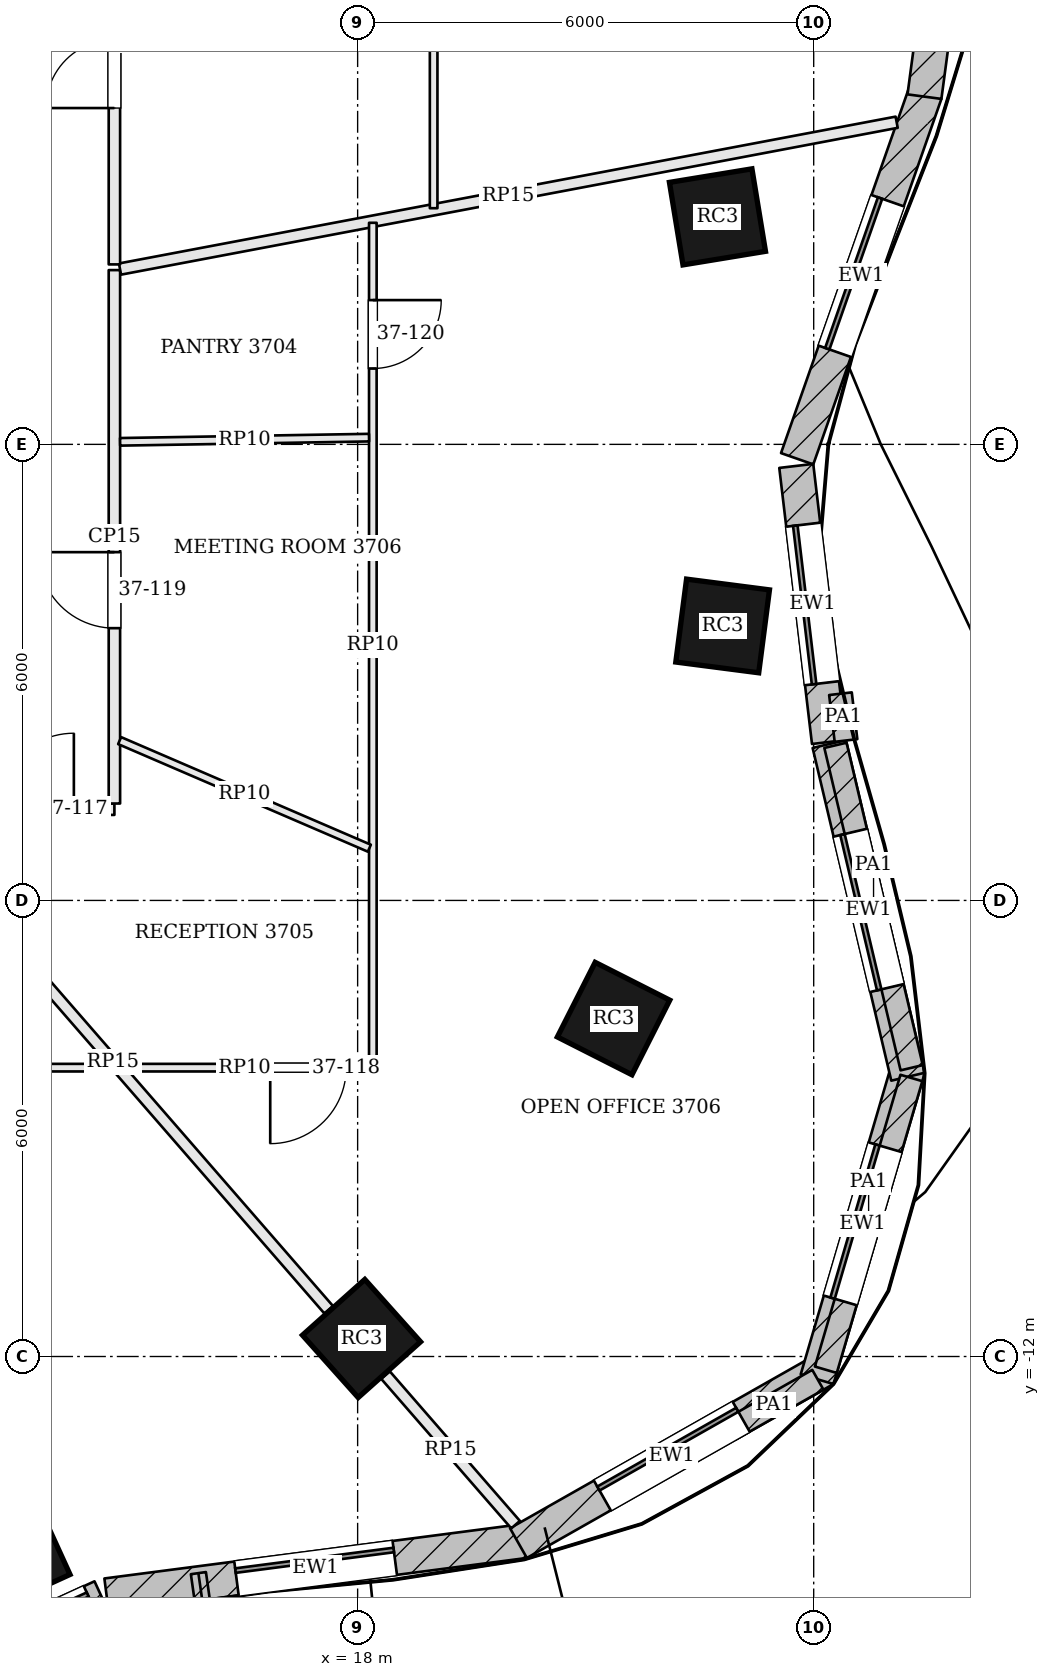
"""IFC4 building model, lengths in metres.
Left out: names, types, materials, properties, quantities, classifications, styles, units other than length and angle.
Written with IfcOpenShell. Run it as: python <this file> out.ifc"""

import sys

from ifc_helpers import new_model, si_unit, direction, frame, frame_2d, origin, origin_2d, place, context, subcontext, project, spatial, rectangle, extrude, element, fill, save


model = new_model("IFC4")
c1 = context("Model", 3, precision=1e-05, world=origin(), true_north=direction((0.0, 1.0)))
c2 = subcontext(c1, "Body", "Model", "MODEL_VIEW")
j1 = project(units=[si_unit("LENGTHUNIT", "METRE"), si_unit("PLANEANGLEUNIT", "RADIAN")], contexts=[c1])
p1 = place(None, origin())
s1 = spatial("IfcSite", under=j1, at=p1, CompositionType="ELEMENT")
p2 = place(p1, origin())
s2 = spatial("IfcBuilding", under=s1, at=p2, CompositionType="ELEMENT")
p3 = place(p2, frame((0.0, 0.0, 153.9)))
s3 = spatial("IfcBuildingStorey", under=s2, at=p3, CompositionType="ELEMENT", Elevation=153.9)
for number, where, z_axis, x_axis in (
    (1, (22.734, 2.993, 0.0), (0.0, 0.0, 1.0), (-0.162, 0.987, 0.0)),
    (2, (13.487, -14.596, 0.0), (0.0, 0.0, 1.0), (0.91, 0.415, 0.0)),
    (3, (18.051, -11.763, 0.0), (0.0, 0.0, 1.0), (0.746, 0.666, 0.0)),
    (4, (21.367, -7.554, 0.0), (0.0, 0.0, 1.0), (0.452, 0.892, 0.0)),
    (5, (22.802, -2.389, 0.0), (0.0, 0.0, 1.0), (0.129, 0.992, 0.0)),
):
    element("IfcColumn", number, at=place(p3, frame(where, z_axis=z_axis, x_axis=x_axis)), inside=s3, PredefinedType="COLUMN", context=c2, shape_type="SweptSolid", body=[
        extrude(rectangle(XDim=1.1, YDim=1.1, at=origin_2d()), origin(), (0.0, 0.0, 1.0), 3.9),
    ])
p4 = place(p3, frame((23.782, -0.189, 0.0), z_axis=(0.0, 0.0, 1.0), x_axis=(0.330794307703, 0.943702880144, 0.0)))
e6 = element("IfcWall", 6, at=p4, inside=s3, PredefinedType="SOLIDWALL", context=c2, shape_type="SweptSolid", body=[
    extrude(rectangle(XDim=5.095, YDim=0.45, at=frame_2d((2.548, 0.0))), origin(), (0.0, 0.0, 1.0), 3.7),
])
p5 = place(p4, frame((1.498, 0.0, 0.9)))
e7 = element("IfcOpeningElement", 7, at=p5, cuts=e6, PredefinedType="OPENING", context=c2, shape_type="SweptSolid", body=[
    extrude(rectangle(XDim=2.1, YDim=2.3, at=frame_2d((1.05, 1.15))), frame((0.0, 0.235, 0.0), z_axis=(0.0, -1.0, 0.0), x_axis=(1.0, 0.0, 0.0)), (0.0, 0.0, 1.0), 0.47),
])
p6 = place(p3, frame((25.457, 4.575, 0.0), z_axis=(0.0, 0.0, 1.0), x_axis=(0.132475046402, 0.991186340746, 0.0)))
e8 = element("IfcWall", 8, at=p6, inside=s3, PredefinedType="SOLIDWALL", context=c2, shape_type="SweptSolid", body=[
    extrude(rectangle(XDim=4.007, YDim=0.45, at=frame_2d((2.003, 0.0))), origin(), (0.0, 0.0, 1.0), 3.7),
])
p7 = place(p6, frame((0.953, 0.0, 0.9)))
e9 = element("IfcOpeningElement", 9, at=p7, cuts=e8, PredefinedType="OPENING", context=c2, shape_type="SweptSolid", body=[
    extrude(rectangle(XDim=2.1, YDim=2.3, at=frame_2d((1.05, 1.15))), frame((0.0, 0.235, 0.0), z_axis=(0.0, -1.0, 0.0), x_axis=(1.0, 0.0, 0.0)), (0.0, 0.0, 1.0), 0.47),
])
p8 = place(p3, frame((12.444, -16.169, 0.0), z_axis=(0.0, 0.0, 1.0), x_axis=(0.908468904074, 0.417952449844, 0.0)))
e10 = element("IfcWall", 10, at=p8, inside=s3, PredefinedType="SOLIDWALL", context=c2, shape_type="SweptSolid", body=[
    extrude(rectangle(XDim=2.409, YDim=0.45, at=frame_2d((1.205, 0.0))), origin(), (0.0, 0.0, 1.0), 3.7),
])
p9 = place(p8, frame((0.155, 0.0, 0.9)))
e11 = element("IfcOpeningElement", 11, at=p9, cuts=e10, PredefinedType="OPENING", context=c2, shape_type="SweptSolid", body=[
    extrude(rectangle(XDim=2.1, YDim=2.3, at=frame_2d((1.05, 1.15))), frame((0.0, 0.235, 0.0), z_axis=(0.0, -1.0, 0.0), x_axis=(1.0, 0.0, 0.0)), (0.0, 0.0, 1.0), 0.47),
])
p10 = place(p3, frame((14.697, -15.143, 0.0), z_axis=(0.0, 0.0, 1.0), x_axis=(0.991631798411, 0.129098320597, 0.0)))
e12 = element("IfcWall", 12, at=p10, inside=s3, PredefinedType="SOLIDWALL", context=c2, shape_type="SweptSolid", body=[
    extrude(rectangle(XDim=5.547, YDim=0.45, at=frame_2d((2.773, 0.0))), origin(), (0.0, 0.0, 1.0), 3.7),
])
p11 = place(p10, frame((1.723, 0.0, 0.9)))
e13 = element("IfcOpeningElement", 13, at=p11, cuts=e12, PredefinedType="OPENING", context=c2, shape_type="SweptSolid", body=[
    extrude(rectangle(XDim=2.1, YDim=2.3, at=frame_2d((1.05, 1.15))), frame((0.0, 0.235, 0.0), z_axis=(0.0, -1.0, 0.0), x_axis=(1.0, 0.0, 0.0)), (0.0, 0.0, 1.0), 0.47),
])
p12 = place(p3, frame((20.115, -14.455, 0.0), z_axis=(0.0, 0.0, 1.0), x_axis=(0.869822679286, 0.493364476427, 0.0)))
e14 = element("IfcWall", 14, at=p12, inside=s3, PredefinedType="SOLIDWALL", context=c2, shape_type="SweptSolid", body=[
    extrude(rectangle(XDim=4.638, YDim=0.45, at=frame_2d((2.319, 0.0))), origin(), (0.0, 0.0, 1.0), 3.7),
])
p13 = place(p12, frame((1.269, 0.0, 0.9)))
e15 = element("IfcOpeningElement", 15, at=p13, cuts=e14, PredefinedType="OPENING", context=c2, shape_type="SweptSolid", body=[
    extrude(rectangle(XDim=2.1, YDim=2.3, at=frame_2d((1.05, 1.15))), frame((0.0, 0.235, 0.0), z_axis=(0.0, -1.0, 0.0), x_axis=(1.0, 0.0, 0.0)), (0.0, 0.0, 1.0), 0.47),
])
p14 = place(p3, frame((24.045, -12.299, 0.0), z_axis=(0.0, 0.0, 1.0), x_axis=(0.281381418228, 0.95959600743, 0.0)))
e16 = element("IfcWall", 16, at=p14, inside=s3, PredefinedType="SOLIDWALL", context=c2, shape_type="SweptSolid", body=[
    extrude(rectangle(XDim=4.261, YDim=0.45, at=frame_2d((2.13, 0.0))), origin(), (0.0, 0.0, 1.0), 3.7),
])
p15 = place(p14, frame((1.081, 0.0, 0.9)))
e17 = element("IfcOpeningElement", 17, at=p15, cuts=e16, PredefinedType="OPENING", context=c2, shape_type="SweptSolid", body=[
    extrude(rectangle(XDim=2.1, YDim=2.3, at=frame_2d((1.05, 1.15))), frame((0.0, 0.235, 0.0), z_axis=(0.0, -1.0, 0.0), x_axis=(1.0, 0.0, 0.0)), (0.0, 0.0, 1.0), 0.47),
])
p16 = place(p3, frame((25.24, -8.319, 0.0), z_axis=(0.0, 0.0, 1.0), x_axis=(-0.230037604827, 0.973181740666, 0.0)))
e18 = element("IfcWall", 18, at=p16, inside=s3, PredefinedType="SOLIDWALL", context=c2, shape_type="SweptSolid", body=[
    extrude(rectangle(XDim=4.498, YDim=0.45, at=frame_2d((2.249, 0.0))), origin(), (0.0, 0.0, 1.0), 3.7),
])
p17 = place(p16, frame((1.199, 0.0, 0.9)))
e19 = element("IfcOpeningElement", 19, at=p17, cuts=e18, PredefinedType="OPENING", context=c2, shape_type="SweptSolid", body=[
    extrude(rectangle(XDim=2.1, YDim=2.3, at=frame_2d((1.05, 1.15))), frame((0.0, 0.235, 0.0), z_axis=(0.0, -1.0, 0.0), x_axis=(1.0, 0.0, 0.0)), (0.0, 0.0, 1.0), 0.47),
])
p18 = place(p3, frame((24.201, -3.915, 0.0), z_axis=(0.0, 0.0, 1.0), x_axis=(-0.117623597589, 0.993058250703, 0.0)))
e20 = element("IfcWall", 20, at=p18, inside=s3, PredefinedType="SOLIDWALL", context=c2, shape_type="SweptSolid", body=[
    extrude(rectangle(XDim=3.657, YDim=0.45, at=frame_2d((1.829, 0.0))), origin(), (0.0, 0.0, 1.0), 3.7),
])
p19 = place(p18, frame((0.779, 0.0, 0.9)))
e21 = element("IfcOpeningElement", 21, at=p19, cuts=e20, PredefinedType="OPENING", context=c2, shape_type="SweptSolid", body=[
    extrude(rectangle(XDim=2.1, YDim=2.3, at=frame_2d((1.05, 1.15))), frame((0.0, 0.235, 0.0), z_axis=(0.0, -1.0, 0.0), x_axis=(1.0, 0.0, 0.0)), (0.0, 0.0, 1.0), 0.47),
])
p20 = place(p3, frame((15.905, -14.85, 0.0), z_axis=(0.0, 0.0, 1.0), x_axis=(0.140913490987, -0.990021912918, 0.0)))
e22 = element("IfcWall", 22, at=p20, inside=s3, PredefinedType="SOLIDWALL", context=c2, shape_type="SweptSolid", body=[
    extrude(rectangle(XDim=1.75, YDim=0.2, at=frame_2d((0.875, 0.0))), origin(), (0.0, 0.0, 1.0), 3.7),
])
p21 = place(p3, frame((22.903, -12.96, 3.9), z_axis=(0.0, 0.0, 1.0), x_axis=(0.869837682326, 0.493338024489, 0.0)))
e23 = element("IfcWall", 23, at=p21, inside=s3, PredefinedType="PARAPET", context=c2, shape_type="SweptSolid", body=[
    extrude(rectangle(XDim=1.325, YDim=0.3, at=frame_2d((0.662, 0.0))), origin(), (0.0, 0.0, 1.0), 1.1),
])
p22 = place(p3, frame((24.16, -12.174, 3.9), z_axis=(0.0, 0.0, 1.0), x_axis=(0.281412876289, 0.959586782453, 0.0)))
e24 = element("IfcWall", 24, at=p22, inside=s3, PredefinedType="PARAPET", context=c2, shape_type="SweptSolid", body=[
    extrude(rectangle(XDim=4.0, YDim=0.3, at=frame_2d((2.0, 0.0))), origin(), (0.0, 0.0, 1.0), 1.1),
])
p23 = place(p3, frame((25.289, -8.201, 3.9), z_axis=(0.0, 0.0, 1.0), x_axis=(-0.230060179164, 0.973176404339, 0.0)))
e25 = element("IfcWall", 25, at=p23, inside=s3, PredefinedType="PARAPET", context=c2, shape_type="SweptSolid", body=[
    extrude(rectangle(XDim=4.358, YDim=0.3, at=frame_2d((2.179, 0.0))), origin(), (0.0, 0.0, 1.0), 1.1),
])
p24 = place(p3, frame((24.425, -3.896, 3.9), z_axis=(0.0, 0.0, 1.0), x_axis=(-0.117389767496, 0.993085918985, 0.0)))
e26 = element("IfcWall", 26, at=p24, inside=s3, PredefinedType="PARAPET", context=c2, shape_type="SweptSolid", body=[
    extrude(rectangle(XDim=0.62, YDim=0.3, at=frame_2d((0.31, 0.0))), origin(), (0.0, 0.0, 1.0), 1.1),
])
p25 = place(p3, frame((20.078, -14.212, 0.0), z_axis=(0.0, 0.0, 1.0), x_axis=(-0.656227405116, 0.754563180108, 0.0)))
e27 = element("IfcWall", 27, at=p25, inside=s3, PredefinedType="PARTITIONING", context=c2, shape_type="SweptSolid", body=[
    extrude(rectangle(XDim=2.607, YDim=0.15, at=frame_2d((1.303, 0.0))), origin(), (0.0, 0.0, 1.0), 3.198),
])
p26 = place(p3, frame((17.619, -11.385, 0.0), z_axis=(0.0, 0.0, 1.0), x_axis=(-0.656270229344, 0.754525934662, 0.0)))
e28 = element("IfcWall", 28, at=p26, inside=s3, PredefinedType="PARTITIONING", context=c2, shape_type="SweptSolid", body=[
    extrude(rectangle(XDim=8.652, YDim=0.15, at=frame_2d((4.326, 0.0))), origin(), (0.0, 0.0, 1.0), 3.198),
])
p27 = place(p3, frame((11.967, -4.8, 0.0), z_axis=(0.0, 0.0, 1.0), x_axis=(1.0, 0.0, 0.0)))
e29 = element("IfcWall", 29, at=p27, inside=s3, PredefinedType="PARTITIONING", context=c2, shape_type="SweptSolid", body=[
    extrude(rectangle(XDim=2.833, YDim=0.15, at=frame_2d((1.417, 0.0))), origin(), (0.0, 0.0, 1.0), 3.198),
])
p28 = place(p27, frame((1.3, 0.0, 0.0)))
e30 = element("IfcOpeningElement", 30, at=p28, cuts=e29, PredefinedType="OPENING", context=c2, shape_type="SweptSolid", body=[
    extrude(rectangle(XDim=1.0, YDim=2.1, at=frame_2d((0.5, 1.05))), frame((0.0, 0.085, 0.0), z_axis=(0.0, -1.0, 0.0), x_axis=(1.0, 0.0, 0.0)), (0.0, 0.0, 1.0), 0.17),
])
p29 = place(p3, frame((14.8, -4.725, 0.0), z_axis=(0.0, 0.0, 1.0), x_axis=(0.0, 1.0, 0.0)))
e31 = element("IfcWall", 31, at=p29, inside=s3, PredefinedType="PARTITIONING", context=c2, shape_type="SweptSolid", body=[
    extrude(rectangle(XDim=7.018, YDim=0.15, at=frame_2d((3.509, 0.0))), origin(), (0.0, 0.0, 1.0), 3.198),
])
p30 = place(p29, frame((2.307, 0.0, 0.0)))
e32 = element("IfcOpeningElement", 32, at=p30, cuts=e31, PredefinedType="OPENING", context=c2, shape_type="SweptSolid", body=[
    extrude(rectangle(XDim=1.0, YDim=2.4, at=frame_2d((0.5, 1.2))), frame((0.0, 0.085, 0.0), z_axis=(0.0, -1.0, 0.0), x_axis=(1.0, 0.0, 0.0)), (0.0, 0.0, 1.0), 0.17),
])
p31 = place(p3, frame((25.092, 4.238, 0.0), z_axis=(0.0, 0.0, 1.0), x_axis=(-0.98259573428, -0.185756892135, 0.0)))
e33 = element("IfcWall", 33, at=p31, inside=s3, PredefinedType="PARTITIONING", context=c2, shape_type="SweptSolid", body=[
    extrude(rectangle(XDim=10.399, YDim=0.15, at=frame_2d((5.199, 0.0))), origin(), (0.0, 0.0, 1.0), 3.198),
])
p32 = place(p3, frame((14.8, 2.368, 0.0), z_axis=(0.0, 0.0, 1.0), x_axis=(0.0, 1.0, 0.0)))
e34 = element("IfcWall", 34, at=p32, inside=s3, PredefinedType="PARTITIONING", context=c2, shape_type="SweptSolid", body=[
    extrude(rectangle(XDim=12.359, YDim=0.15, at=frame_2d((6.18, 0.0))), origin(), (0.0, 0.0, 1.0), 3.198),
])
p33 = place(p32, frame((2.057, 0.0, 0.0)))
e35 = element("IfcOpeningElement", 35, at=p33, cuts=e34, PredefinedType="OPENING", context=c2, shape_type="SweptSolid", body=[
    extrude(rectangle(XDim=1.8, YDim=2.1, at=frame_2d((0.9, 1.05))), frame((0.0, 0.085, 0.0), z_axis=(0.0, -1.0, 0.0), x_axis=(1.0, 0.0, 0.0)), (0.0, 0.0, 1.0), 0.17),
])
p34 = place(p32, frame((8.465, 0.0, 0.0)))
e36 = element("IfcOpeningElement", 36, at=p34, cuts=e34, PredefinedType="OPENING", context=c2, shape_type="SweptSolid", body=[
    extrude(rectangle(XDim=1.0, YDim=2.4, at=frame_2d((0.5, 1.2))), frame((0.0, 0.085, 0.0), z_axis=(0.0, -1.0, 0.0), x_axis=(1.0, 0.0, 0.0)), (0.0, 0.0, 1.0), 0.17),
])
p35 = place(p3, frame((14.823, -8.2, 0.0), z_axis=(0.0, 0.0, 1.0), x_axis=(-1.0, 0.0, 0.0)))
e37 = element("IfcWall", 37, at=p35, inside=s3, PredefinedType="PARTITIONING", context=c2, shape_type="SweptSolid", body=[
    extrude(rectangle(XDim=14.622, YDim=0.1, at=frame_2d((7.311, 0.0))), origin(), (0.0, 0.0, 1.0), 3.184),
])
p36 = place(p35, frame((11.504, 0.0, 0.0)))
e38 = element("IfcOpeningElement", 38, at=p36, cuts=e37, PredefinedType="OPENING", context=c2, shape_type="SweptSolid", body=[
    extrude(rectangle(XDim=1.0, YDim=2.1, at=frame_2d((0.5, 1.05))), frame((0.0, 0.06, 0.0), z_axis=(0.0, -1.0, 0.0), x_axis=(1.0, 0.0, 0.0)), (0.0, 0.0, 1.0), 0.12),
])
p37 = place(p35, frame((2.118, 0.0, 0.0)))
e39 = element("IfcOpeningElement", 39, at=p37, cuts=e37, PredefinedType="OPENING", context=c2, shape_type="SweptSolid", body=[
    extrude(rectangle(XDim=0.9, YDim=2.1, at=frame_2d((0.45, 1.05))), frame((0.0, 0.06, 0.0), z_axis=(0.0, -1.0, 0.0), x_axis=(1.0, 0.0, 0.0)), (0.0, 0.0, 1.0), 0.12),
])
p38 = place(p3, frame((18.2, 2.915, 0.0), z_axis=(0.0, 0.0, 1.0), x_axis=(0.0, -1.0, 0.0)))
e40 = element("IfcWall", 40, at=p38, inside=s3, PredefinedType="PARTITIONING", context=c2, shape_type="SweptSolid", body=[
    extrude(rectangle(XDim=11.115, YDim=0.1, at=frame_2d((5.558, 0.0))), origin(), (0.0, 0.0, 1.0), 3.184),
])
p39 = place(p38, frame((1.017, 0.0, 0.0)))
e41 = element("IfcOpeningElement", 41, at=p39, cuts=e40, PredefinedType="OPENING", context=c2, shape_type="SweptSolid", body=[
    extrude(rectangle(XDim=0.9, YDim=2.1, at=frame_2d((0.45, 1.05))), frame((0.0, 0.06, 0.0), z_axis=(0.0, -1.0, 0.0), x_axis=(1.0, 0.0, 0.0)), (0.0, 0.0, 1.0), 0.12),
])
p40 = place(p3, frame((18.15, -8.2, 0.0), z_axis=(0.0, 0.0, 1.0), x_axis=(-1.0, 0.0, 0.0)))
e42 = element("IfcWall", 42, at=p40, inside=s3, PredefinedType="PARTITIONING", context=c2, shape_type="SweptSolid", body=[
    extrude(rectangle(XDim=3.274, YDim=0.1, at=frame_2d((1.637, 0.0))), origin(), (0.0, 0.0, 1.0), 3.184),
])
p41 = place(p40, frame((0.3, 0.0, 0.0)))
e43 = element("IfcOpeningElement", 43, at=p41, cuts=e42, PredefinedType="OPENING", context=c2, shape_type="SweptSolid", body=[
    extrude(rectangle(XDim=1.0, YDim=2.1, at=frame_2d((0.5, 1.05))), frame((0.0, 0.06, 0.0), z_axis=(0.0, -1.0, 0.0), x_axis=(1.0, 0.0, 0.0)), (0.0, 0.0, 1.0), 0.12),
])
p42 = place(p3, frame((14.869, -3.897, 0.0), z_axis=(0.0, 0.0, 1.0), x_axis=(0.918373696942, -0.395714231188, 0.0)))
e44 = element("IfcWall", 44, at=p42, inside=s3, PredefinedType="PARTITIONING", context=c2, shape_type="SweptSolid", body=[
    extrude(rectangle(XDim=3.577, YDim=0.1, at=frame_2d((1.789, 0.0))), origin(), (0.0, 0.0, 1.0), 3.184),
])
p43 = place(p3, frame((14.875, 0.033, 0.0), z_axis=(0.0, 0.0, 1.0), x_axis=(0.999856843244, 0.016920195573, 0.0)))
e45 = element("IfcWall", 45, at=p43, inside=s3, PredefinedType="PARTITIONING", context=c2, shape_type="SweptSolid", body=[
    extrude(rectangle(XDim=3.275, YDim=0.1, at=frame_2d((1.638, 0.0))), origin(), (0.0, 0.0, 1.0), 3.184),
])
p44 = place(p3, frame((19.0, 13.27, 0.0), z_axis=(0.0, 0.0, 1.0), x_axis=(0.0, -1.0, 0.0)))
e46 = element("IfcWall", 46, at=p44, inside=s3, PredefinedType="PARTITIONING", context=c2, shape_type="SweptSolid", body=[
    extrude(rectangle(XDim=10.163, YDim=0.1, at=frame_2d((5.082, 0.0))), origin(), (0.0, 0.0, 1.0), 3.184),
])
p45 = place(p44, frame((5.648, 0.0, 0.0)))
e47 = element("IfcOpeningElement", 47, at=p45, cuts=e46, PredefinedType="OPENING", context=c2, shape_type="SweptSolid", body=[
    extrude(rectangle(XDim=1.0, YDim=2.1, at=frame_2d((0.5, 1.05))), frame((0.0, 0.06, 0.0), z_axis=(0.0, -1.0, 0.0), x_axis=(1.0, 0.0, 0.0)), (0.0, 0.0, 1.0), 0.12),
])
p46 = place(p5, origin())
e48 = element("IfcWindow", 48, at=p46, inside=s3, PartitioningType="SINGLE_PANEL", PredefinedType="WINDOW", context=c2, shape_type="SweptSolid", body=[
    extrude(rectangle(XDim=2.1, YDim=2.3, at=frame_2d((1.05, 1.15))), frame((0.0, 0.135, 0.0), z_axis=(0.0, -1.0, 0.0), x_axis=(1.0, 0.0, 0.0)), (0.0, 0.0, 1.0), 0.06),
])
fill(e7, e48)
p47 = place(p9, origin())
e49 = element("IfcWindow", 49, at=p47, inside=s3, PartitioningType="SINGLE_PANEL", PredefinedType="WINDOW", context=c2, shape_type="SweptSolid", body=[
    extrude(rectangle(XDim=2.1, YDim=2.3, at=frame_2d((1.05, 1.15))), frame((0.0, 0.135, 0.0), z_axis=(0.0, -1.0, 0.0), x_axis=(1.0, 0.0, 0.0)), (0.0, 0.0, 1.0), 0.06),
])
fill(e11, e49)
p48 = place(p11, origin())
e50 = element("IfcWindow", 50, at=p48, inside=s3, PartitioningType="SINGLE_PANEL", PredefinedType="WINDOW", context=c2, shape_type="SweptSolid", body=[
    extrude(rectangle(XDim=2.1, YDim=2.3, at=frame_2d((1.05, 1.15))), frame((0.0, 0.135, 0.0), z_axis=(0.0, -1.0, 0.0), x_axis=(1.0, 0.0, 0.0)), (0.0, 0.0, 1.0), 0.06),
])
fill(e13, e50)
p49 = place(p13, origin())
e51 = element("IfcWindow", 51, at=p49, inside=s3, PartitioningType="SINGLE_PANEL", PredefinedType="WINDOW", context=c2, shape_type="SweptSolid", body=[
    extrude(rectangle(XDim=2.1, YDim=2.3, at=frame_2d((1.05, 1.15))), frame((0.0, 0.135, 0.0), z_axis=(0.0, -1.0, 0.0), x_axis=(1.0, 0.0, 0.0)), (0.0, 0.0, 1.0), 0.06),
])
fill(e15, e51)
p50 = place(p15, origin())
e52 = element("IfcWindow", 52, at=p50, inside=s3, PartitioningType="SINGLE_PANEL", PredefinedType="WINDOW", context=c2, shape_type="SweptSolid", body=[
    extrude(rectangle(XDim=2.1, YDim=2.3, at=frame_2d((1.05, 1.15))), frame((0.0, 0.135, 0.0), z_axis=(0.0, -1.0, 0.0), x_axis=(1.0, 0.0, 0.0)), (0.0, 0.0, 1.0), 0.06),
])
fill(e17, e52)
p51 = place(p17, origin())
e53 = element("IfcWindow", 53, at=p51, inside=s3, PartitioningType="SINGLE_PANEL", PredefinedType="WINDOW", context=c2, shape_type="SweptSolid", body=[
    extrude(rectangle(XDim=2.1, YDim=2.3, at=frame_2d((1.05, 1.15))), frame((0.0, 0.135, 0.0), z_axis=(0.0, -1.0, 0.0), x_axis=(1.0, 0.0, 0.0)), (0.0, 0.0, 1.0), 0.06),
])
fill(e19, e53)
p52 = place(p19, origin())
e54 = element("IfcWindow", 54, at=p52, inside=s3, PartitioningType="SINGLE_PANEL", PredefinedType="WINDOW", context=c2, shape_type="SweptSolid", body=[
    extrude(rectangle(XDim=2.1, YDim=2.3, at=frame_2d((1.05, 1.15))), frame((0.0, 0.135, 0.0), z_axis=(0.0, -1.0, 0.0), x_axis=(1.0, 0.0, 0.0)), (0.0, 0.0, 1.0), 0.06),
])
fill(e21, e54)
p53 = place(p28, origin())
e55 = element("IfcDoor", 55, at=p53, inside=s3, OperationType="SINGLE_SWING_RIGHT", PredefinedType="DOOR", context=c2, shape_type="SweptSolid", body=[
    extrude(rectangle(XDim=1.0, YDim=2.1, at=frame_2d((0.5, 1.05))), frame((0.0, 0.025, 0.0), z_axis=(0.0, -1.0, 0.0), x_axis=(1.0, 0.0, 0.0)), (0.0, 0.0, 1.0), 0.05),
])
fill(e30, e55)
p54 = place(p41, origin())
e56 = element("IfcDoor", 56, at=p54, inside=s3, OperationType="SINGLE_SWING_RIGHT", PredefinedType="DOOR", context=c2, shape_type="SweptSolid", body=[
    extrude(rectangle(XDim=1.0, YDim=2.1, at=frame_2d((0.5, 1.05))), frame((0.0, 0.025, 0.0), z_axis=(0.0, -1.0, 0.0), x_axis=(1.0, 0.0, 0.0)), (0.0, 0.0, 1.0), 0.05),
])
fill(e43, e56)
p55 = place(p30, origin())
e57 = element("IfcDoor", 57, at=p55, inside=s3, OperationType="SINGLE_SWING_RIGHT", PredefinedType="DOOR", context=c2, shape_type="SweptSolid", body=[
    extrude(rectangle(XDim=1.0, YDim=2.4, at=frame_2d((0.5, 1.2))), frame((0.0, 0.025, 0.0), z_axis=(0.0, -1.0, 0.0), x_axis=(1.0, 0.0, 0.0)), (0.0, 0.0, 1.0), 0.05),
])
fill(e32, e57)
p56 = place(p39, origin())
e58 = element("IfcDoor", 58, at=p56, inside=s3, OperationType="SINGLE_SWING_LEFT", PredefinedType="DOOR", context=c2, shape_type="SweptSolid", body=[
    extrude(rectangle(XDim=0.9, YDim=2.1, at=frame_2d((0.45, 1.05))), frame((0.0, 0.025, 0.0), z_axis=(0.0, -1.0, 0.0), x_axis=(1.0, 0.0, 0.0)), (0.0, 0.0, 1.0), 0.05),
])
fill(e41, e58)
p57 = place(p33, origin())
e59 = element("IfcDoor", 59, at=p57, inside=s3, OperationType="DOUBLE_DOOR_SINGLE_SWING", PredefinedType="DOOR", context=c2, shape_type="SweptSolid", body=[
    extrude(rectangle(XDim=1.8, YDim=2.1, at=frame_2d((0.9, 1.05))), frame((0.0, 0.025, 0.0), z_axis=(0.0, -1.0, 0.0), x_axis=(1.0, 0.0, 0.0)), (0.0, 0.0, 1.0), 0.05),
])
fill(e35, e59)
save(model, sys.argv[1])
